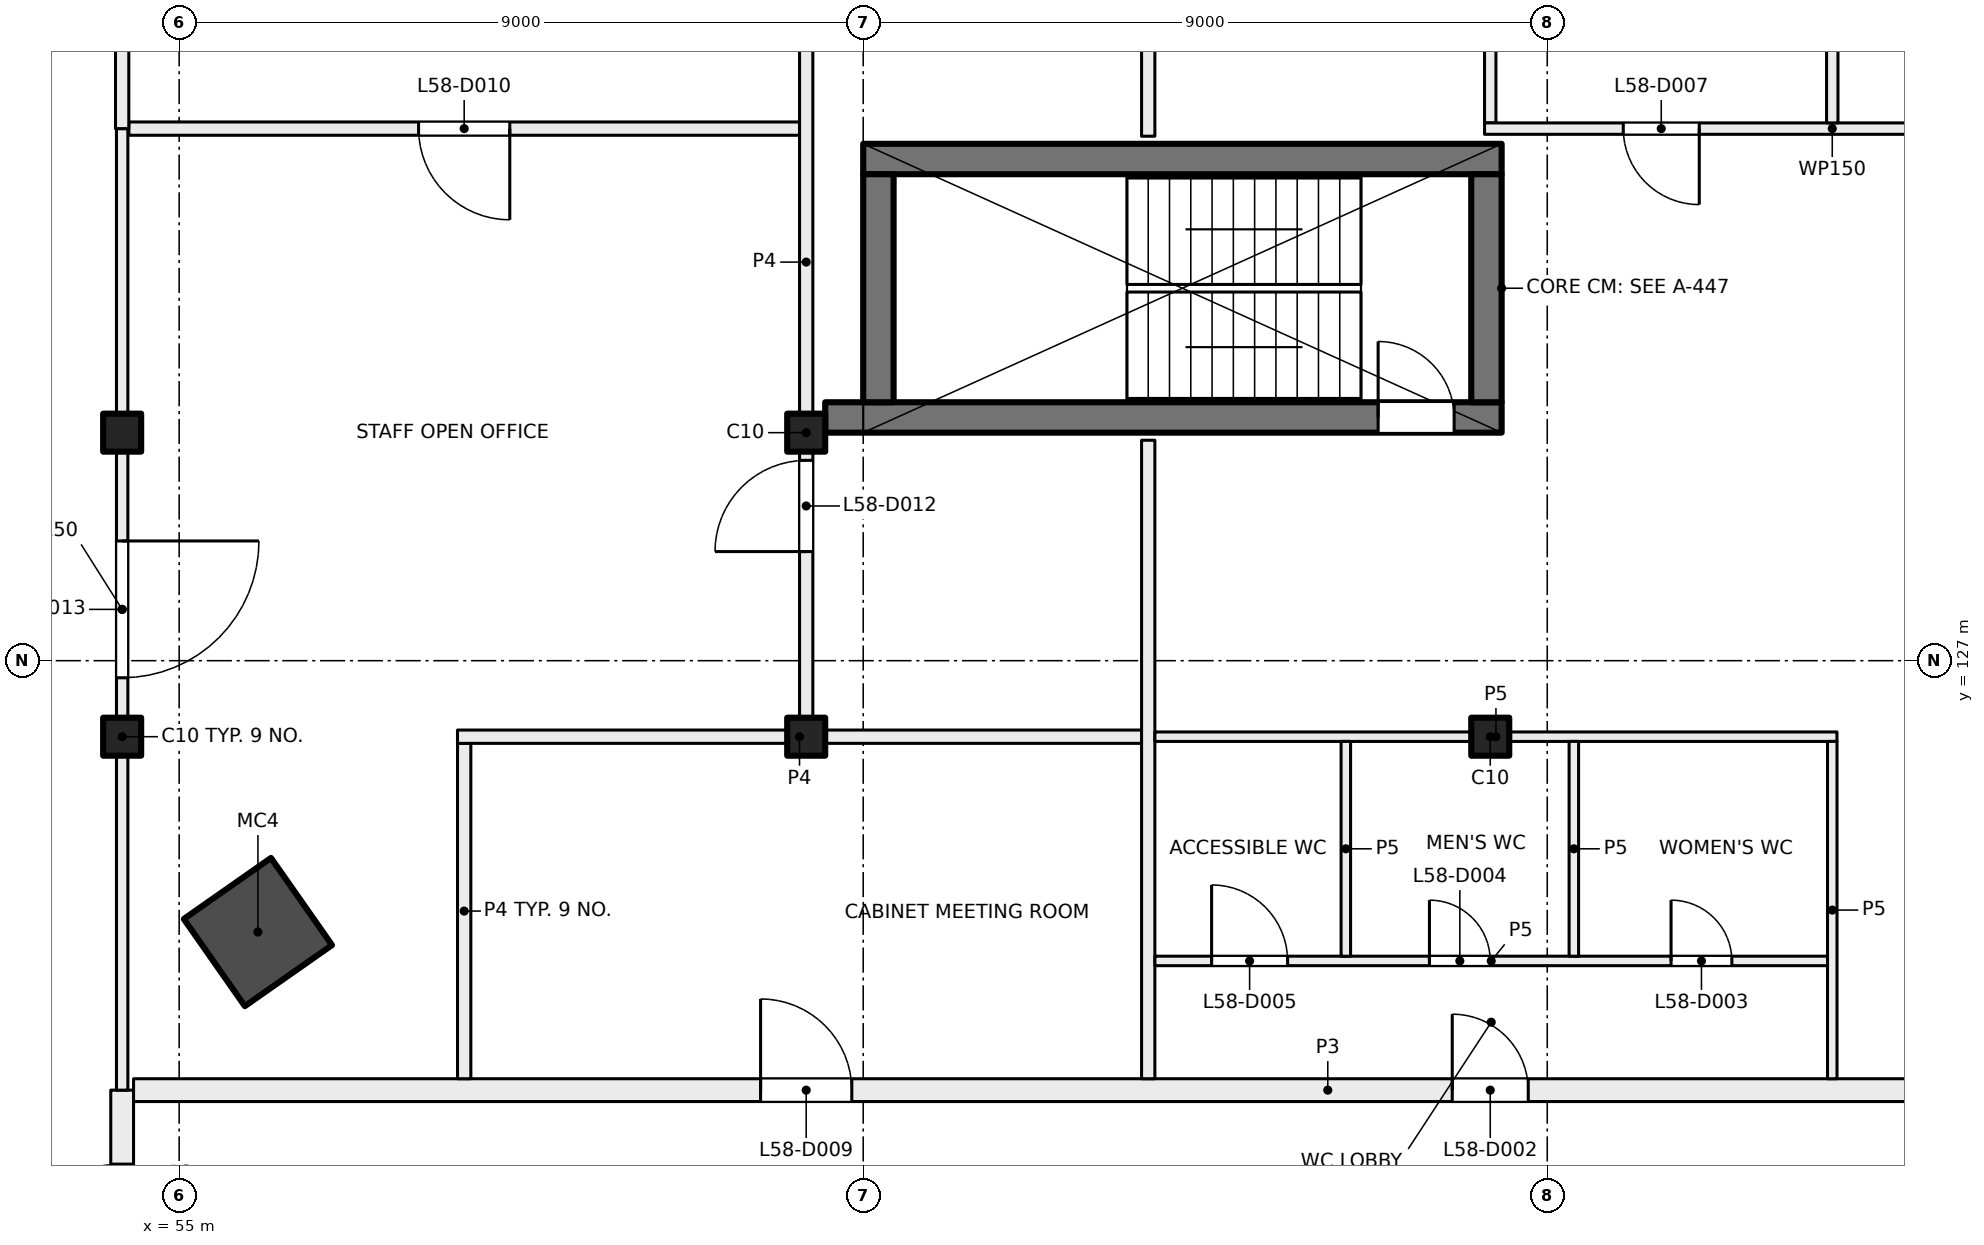
"""IFC4 building model, lengths in metres.
Left out: names, types, materials, properties, quantities, classifications, styles, units other than length and angle.
Written with IfcOpenShell. Run it as: python <this file> out.ifc"""

import sys

from ifc_helpers import new_model, si_unit, direction, frame, frame_2d, origin, origin_2d, place, context, subcontext, project, spatial, rectangle, hollow_rectangle, extrude, element, fill, save


model = new_model("IFC4")
c1 = context("Model", 3, precision=1e-05, world=origin(), true_north=direction((0.0, 1.0)))
c2 = subcontext(c1, "Body", "Model", "MODEL_VIEW")
j1 = project(units=[si_unit("LENGTHUNIT", "METRE"), si_unit("PLANEANGLEUNIT", "RADIAN")], contexts=[c1])
p1 = place(None, origin())
s1 = spatial("IfcSite", under=j1, at=p1, CompositionType="ELEMENT")
p2 = place(p1, origin())
s2 = spatial("IfcBuilding", under=s1, at=p2, CompositionType="ELEMENT")
p3 = place(p2, frame((0.0, 0.0, 245.5)))
s3 = spatial("IfcBuildingStorey", under=s2, at=p3, CompositionType="ELEMENT", Elevation=245.5)
p4 = place(p3, frame((56.036, 123.43, 0.0), z_axis=(0.0, 0.0, 1.0), x_axis=(0.573576436351, -0.819152044289, 0.0)))
e1 = element("IfcColumn", 1, at=p4, inside=s3, PredefinedType="COLUMN", context=c2, shape_type="SweptSolid", body=[
    extrude(hollow_rectangle(XDim=1.4, YDim=1.4, WallThickness=0.025, at=origin_2d()), origin(), (0.0, 0.0, 1.0), 4.0),
])
for number, where, z_axis, x_axis in (
    (2, (54.25, 130.0, 0.0), (0.0, 0.0, 1.0), (1.0, 0.0, 0.0)),
    (3, (63.25, 130.0, 0.0), (0.0, 0.0, 1.0), (1.0, 0.0, 0.0)),
    (4, (54.25, 126.0, 0.0), (0.0, 0.0, 1.0), (1.0, 0.0, 0.0)),
    (5, (63.25, 126.0, 0.0), (0.0, 0.0, 1.0), (1.0, 0.0, 0.0)),
    (6, (72.25, 126.0, 0.0), (0.0, 0.0, 1.0), (1.0, 0.0, 0.0)),
):
    element("IfcColumn", number, at=place(p3, frame(where, z_axis=z_axis, x_axis=x_axis)), inside=s3, PredefinedType="COLUMN", context=c2, shape_type="SweptSolid", body=[
        extrude(rectangle(XDim=0.5, YDim=0.5, at=origin_2d()), origin(), (0.0, 0.0, 1.0), 4.0),
    ])
p5 = place(p3, frame((63.5, 130.2, 0.0), z_axis=(0.0, 0.0, 1.0), x_axis=(1.0, 0.0, 0.0)))
e7 = element("IfcWall", 7, at=p5, inside=s3, PredefinedType="SHEAR", context=c2, shape_type="SweptSolid", body=[
    extrude(rectangle(XDim=8.9, YDim=0.4, at=frame_2d((4.45, 0.0))), origin(), (0.0, 0.0, 1.0), 4.0),
])
p6 = place(p5, frame((7.275, 0.0, 0.0)))
e8 = element("IfcOpeningElement", 8, at=p6, cuts=e7, PredefinedType="OPENING", context=c2, shape_type="SweptSolid", body=[
    extrude(rectangle(XDim=1.0, YDim=2.1, at=frame_2d((0.5, 1.05))), frame((0.0, 0.21, 0.0), z_axis=(0.0, -1.0, 0.0), x_axis=(1.0, 0.0, 0.0)), (0.0, 0.0, 1.0), 0.42),
])
p7 = place(p3, frame((64.0, 133.6, 0.0), z_axis=(0.0, 0.0, 1.0), x_axis=(1.0, 0.0, 0.0)))
e9 = element("IfcWall", 9, at=p7, inside=s3, PredefinedType="SHEAR", context=c2, shape_type="SweptSolid", body=[
    extrude(rectangle(XDim=8.4, YDim=0.4, at=frame_2d((4.2, 0.0))), origin(), (0.0, 0.0, 1.0), 4.0),
])
for number, where, z_axis, x_axis in (
    (10, (64.2, 130.4, 0.0), (0.0, 0.0, 1.0), (0.0, 1.0, 0.0)),
    (11, (72.2, 130.4, 0.0), (0.0, 0.0, 1.0), (0.0, 1.0, 0.0)),
):
    element("IfcWall", number, at=place(p3, frame(where, z_axis=z_axis, x_axis=x_axis)), inside=s3, PredefinedType="SHEAR", context=c2, shape_type="SweptSolid", body=[
        extrude(rectangle(XDim=3.0, YDim=0.4, at=frame_2d((1.5, 0.0))), origin(), (0.0, 0.0, 1.0), 4.0),
    ])
p8 = place(p3, frame((54.25, 117.6, 0.0), z_axis=(0.0, 0.0, 1.0), x_axis=(0.0, 1.0, 0.0)))
e12 = element("IfcWall", 12, at=p8, inside=s3, PredefinedType="PARTITIONING", context=c2, shape_type="SweptSolid", body=[
    extrude(rectangle(XDim=3.75, YDim=0.3, at=frame_2d((1.875, 0.0))), origin(), (0.0, 0.0, 1.0), 3.625),
])
p9 = place(p8, frame((0.977, 0.0, 0.0)))
e13 = element("IfcOpeningElement", 13, at=p9, cuts=e12, PredefinedType="OPENING", context=c2, shape_type="SweptSolid", body=[
    extrude(rectangle(XDim=1.8, YDim=2.1, at=frame_2d((0.9, 1.05))), frame((0.0, 0.16, 0.0), z_axis=(0.0, -1.0, 0.0), x_axis=(1.0, 0.0, 0.0)), (0.0, 0.0, 1.0), 0.32),
])
p10 = place(p3, frame((54.4, 121.35, 0.0), z_axis=(0.0, 0.0, 1.0), x_axis=(1.0, 0.0, 0.0)))
e14 = element("IfcWall", 14, at=p10, inside=s3, PredefinedType="PARTITIONING", context=c2, shape_type="SweptSolid", body=[
    extrude(rectangle(XDim=31.425, YDim=0.3, at=frame_2d((15.712, 0.0))), origin(), (0.0, 0.0, 1.0), 3.625),
])
p11 = place(p10, frame((17.35, 0.0, 0.0)))
e15 = element("IfcOpeningElement", 15, at=p11, cuts=e14, PredefinedType="OPENING", context=c2, shape_type="SweptSolid", body=[
    extrude(rectangle(XDim=1.0, YDim=2.1, at=frame_2d((0.5, 1.05))), frame((0.0, 0.16, 0.0), z_axis=(0.0, -1.0, 0.0), x_axis=(1.0, 0.0, 0.0)), (0.0, 0.0, 1.0), 0.32),
])
p12 = place(p10, frame((25.95, 0.0, 0.0)))
e16 = element("IfcOpeningElement", 16, at=p12, cuts=e14, PredefinedType="OPENING", context=c2, shape_type="SweptSolid", body=[
    extrude(rectangle(XDim=1.8, YDim=2.1, at=frame_2d((0.9, 1.05))), frame((0.0, 0.16, 0.0), z_axis=(0.0, -1.0, 0.0), x_axis=(1.0, 0.0, 0.0)), (0.0, 0.0, 1.0), 0.32),
])
p13 = place(p10, frame((8.25, 0.0, 0.0)))
e17 = element("IfcOpeningElement", 17, at=p13, cuts=e14, PredefinedType="OPENING", context=c2, shape_type="SweptSolid", body=[
    extrude(rectangle(XDim=1.2, YDim=2.1, at=frame_2d((0.6, 1.05))), frame((0.0, 0.16, 0.0), z_axis=(0.0, -1.0, 0.0), x_axis=(1.0, 0.0, 0.0)), (0.0, 0.0, 1.0), 0.32),
])
p14 = place(p3, frame((54.25, 134.0, 0.0), z_axis=(0.0, 0.0, 1.0), x_axis=(0.0, -1.0, 0.0)))
e18 = element("IfcWall", 18, at=p14, inside=s3, PredefinedType="PARTITIONING", context=c2, shape_type="SweptSolid", body=[
    extrude(rectangle(XDim=12.65, YDim=0.15, at=frame_2d((6.325, 0.0))), origin(), (0.0, 0.0, 1.0), 3.625),
])
p15 = place(p14, frame((5.425, 0.0, 0.0)))
e19 = element("IfcOpeningElement", 19, at=p15, cuts=e18, PredefinedType="OPENING", context=c2, shape_type="SweptSolid", body=[
    extrude(rectangle(XDim=1.8, YDim=2.1, at=frame_2d((0.9, 1.05))), frame((0.0, 0.085, 0.0), z_axis=(0.0, -1.0, 0.0), x_axis=(1.0, 0.0, 0.0)), (0.0, 0.0, 1.0), 0.17),
])
p16 = place(p3, frame((63.162, 134.0, 0.0), z_axis=(0.0, 0.0, 1.0), x_axis=(-1.0, 0.0, 0.0)))
e20 = element("IfcWall", 20, at=p16, inside=s3, PredefinedType="PARTITIONING", context=c2, shape_type="SweptSolid", body=[
    extrude(rectangle(XDim=8.824, YDim=0.175, at=frame_2d((4.412, 0.0))), origin(), (0.0, 0.0, 1.0), 3.625),
])
p17 = place(p16, frame((3.812, 0.0, 0.0)))
e21 = element("IfcOpeningElement", 21, at=p17, cuts=e20, PredefinedType="OPENING", context=c2, shape_type="SweptSolid", body=[
    extrude(rectangle(XDim=1.2, YDim=2.1, at=frame_2d((0.6, 1.05))), frame((0.0, 0.097, 0.0), z_axis=(0.0, -1.0, 0.0), x_axis=(1.0, 0.0, 0.0)), (0.0, 0.0, 1.0), 0.195),
])
p18 = place(p3, frame((54.25, 138.4, 0.0), z_axis=(0.0, 0.0, 1.0), x_axis=(0.0, -1.0, 0.0)))
e22 = element("IfcWall", 22, at=p18, inside=s3, PredefinedType="PARTITIONING", context=c2, shape_type="SweptSolid", body=[
    extrude(rectangle(XDim=4.4, YDim=0.175, at=frame_2d((2.2, 0.0))), origin(), (0.0, 0.0, 1.0), 3.625),
])
p19 = place(p3, frame((58.75, 125.912, 0.0), z_axis=(0.0, 0.0, 1.0), x_axis=(0.0, -1.0, 0.0)))
e23 = element("IfcWall", 23, at=p19, inside=s3, PredefinedType="PARTITIONING", context=c2, shape_type="SweptSolid", body=[
    extrude(rectangle(XDim=4.412, YDim=0.175, at=frame_2d((2.206, 0.0))), origin(), (0.0, 0.0, 1.0), 3.625),
])
p20 = place(p3, frame((58.662, 126.0, 0.0), z_axis=(0.0, 0.0, 1.0), x_axis=(1.0, 0.0, 0.0)))
e24 = element("IfcWall", 24, at=p20, inside=s3, PredefinedType="PARTITIONING", context=c2, shape_type="SweptSolid", body=[
    extrude(rectangle(XDim=9.0, YDim=0.175, at=frame_2d((4.5, 0.0))), origin(), (0.0, 0.0, 1.0), 3.625),
])
p21 = place(p3, frame((63.25, 126.088, 0.0), z_axis=(0.0, 0.0, 1.0), x_axis=(0.0, 1.0, 0.0)))
e25 = element("IfcWall", 25, at=p21, inside=s3, PredefinedType="PARTITIONING", context=c2, shape_type="SweptSolid", body=[
    extrude(rectangle(XDim=12.312, YDim=0.175, at=frame_2d((6.156, 0.0))), origin(), (0.0, 0.0, 1.0), 3.625),
])
p22 = place(p21, frame((2.347, 0.0, 0.0)))
e26 = element("IfcOpeningElement", 26, at=p22, cuts=e25, PredefinedType="OPENING", context=c2, shape_type="SweptSolid", body=[
    extrude(rectangle(XDim=1.2, YDim=2.1, at=frame_2d((0.6, 1.05))), frame((0.0, 0.097, 0.0), z_axis=(0.0, -1.0, 0.0), x_axis=(1.0, 0.0, 0.0)), (0.0, 0.0, 1.0), 0.195),
])
p23 = place(p3, frame((67.75, 121.5, 0.0), z_axis=(0.0, 0.0, 1.0), x_axis=(0.0, 1.0, 0.0)))
e27 = element("IfcWall", 27, at=p23, inside=s3, PredefinedType="PARTITIONING", context=c2, shape_type="SweptSolid", body=[
    extrude(rectangle(XDim=8.4, YDim=0.175, at=frame_2d((4.2, 0.0))), origin(), (0.0, 0.0, 1.0), 3.625),
])
p24 = place(p3, frame((67.838, 123.05, 0.0), z_axis=(0.0, 0.0, 1.0), x_axis=(1.0, 0.0, 0.0)))
e28 = element("IfcWall", 28, at=p24, inside=s3, PredefinedType="PARTITIONING", context=c2, shape_type="SweptSolid", body=[
    extrude(rectangle(XDim=8.85, YDim=0.125, at=frame_2d((4.425, 0.0))), origin(), (0.0, 0.0, 1.0), 3.625),
])
p25 = place(p24, frame((6.791, 0.0, 0.0)))
e29 = element("IfcOpeningElement", 29, at=p25, cuts=e28, PredefinedType="OPENING", context=c2, shape_type="SweptSolid", body=[
    extrude(rectangle(XDim=0.8, YDim=2.1, at=frame_2d((0.4, 1.05))), frame((0.0, 0.073, 0.0), z_axis=(0.0, -1.0, 0.0), x_axis=(1.0, 0.0, 0.0)), (0.0, 0.0, 1.0), 0.145),
])
p26 = place(p24, frame((3.612, 0.0, 0.0)))
e30 = element("IfcOpeningElement", 30, at=p26, cuts=e28, PredefinedType="OPENING", context=c2, shape_type="SweptSolid", body=[
    extrude(rectangle(XDim=0.8, YDim=2.1, at=frame_2d((0.4, 1.05))), frame((0.0, 0.073, 0.0), z_axis=(0.0, -1.0, 0.0), x_axis=(1.0, 0.0, 0.0)), (0.0, 0.0, 1.0), 0.145),
])
p27 = place(p24, frame((0.746, 0.0, 0.0)))
e31 = element("IfcOpeningElement", 31, at=p27, cuts=e28, PredefinedType="OPENING", context=c2, shape_type="SweptSolid", body=[
    extrude(rectangle(XDim=1.0, YDim=2.1, at=frame_2d((0.5, 1.05))), frame((0.0, 0.073, 0.0), z_axis=(0.0, -1.0, 0.0), x_axis=(1.0, 0.0, 0.0)), (0.0, 0.0, 1.0), 0.145),
])
p28 = place(p3, frame((67.838, 126.0, 0.0), z_axis=(0.0, 0.0, 1.0), x_axis=(1.0, 0.0, 0.0)))
e32 = element("IfcWall", 32, at=p28, inside=s3, PredefinedType="PARTITIONING", context=c2, shape_type="SweptSolid", body=[
    extrude(rectangle(XDim=8.974, YDim=0.125, at=frame_2d((4.487, 0.0))), origin(), (0.0, 0.0, 1.0), 3.625),
])
p29 = place(p3, frame((67.75, 133.9, 0.0), z_axis=(0.0, 0.0, 1.0), x_axis=(0.0, 1.0, 0.0)))
e33 = element("IfcWall", 33, at=p29, inside=s3, PredefinedType="PARTITIONING", context=c2, shape_type="SweptSolid", body=[
    extrude(rectangle(XDim=4.5, YDim=0.175, at=frame_2d((2.25, 0.0))), origin(), (0.0, 0.0, 1.0), 3.625),
])
p30 = place(p3, frame((70.35, 125.938, 0.0), z_axis=(0.0, 0.0, 1.0), x_axis=(0.0, -1.0, 0.0)))
e34 = element("IfcWall", 34, at=p30, inside=s3, PredefinedType="PARTITIONING", context=c2, shape_type="SweptSolid", body=[
    extrude(rectangle(XDim=2.826, YDim=0.125, at=frame_2d((1.413, 0.0))), origin(), (0.0, 0.0, 1.0), 3.625),
])
p31 = place(p3, frame((72.25, 134.075, 0.0), z_axis=(0.0, 0.0, 1.0), x_axis=(0.0, 1.0, 0.0)))
e35 = element("IfcWall", 35, at=p31, inside=s3, PredefinedType="PARTITIONING", context=c2, shape_type="SweptSolid", body=[
    extrude(rectangle(XDim=4.325, YDim=0.15, at=frame_2d((2.163, 0.0))), origin(), (0.0, 0.0, 1.0), 3.625),
])
p32 = place(p3, frame((81.325, 134.0, 0.0), z_axis=(0.0, 0.0, 1.0), x_axis=(-1.0, 0.0, 0.0)))
e36 = element("IfcWall", 36, at=p32, inside=s3, PredefinedType="PARTITIONING", context=c2, shape_type="SweptSolid", body=[
    extrude(rectangle(XDim=9.15, YDim=0.15, at=frame_2d((4.575, 0.0))), origin(), (0.0, 0.0, 1.0), 3.625),
])
p33 = place(p32, frame((1.825, 0.0, 0.0)))
e37 = element("IfcOpeningElement", 37, at=p33, cuts=e36, PredefinedType="OPENING", context=c2, shape_type="SweptSolid", body=[
    extrude(rectangle(XDim=1.0, YDim=2.1, at=frame_2d((0.5, 1.05))), frame((0.0, 0.085, 0.0), z_axis=(0.0, -1.0, 0.0), x_axis=(1.0, 0.0, 0.0)), (0.0, 0.0, 1.0), 0.17),
])
p34 = place(p32, frame((6.325, 0.0, 0.0)))
e38 = element("IfcOpeningElement", 38, at=p34, cuts=e36, PredefinedType="OPENING", context=c2, shape_type="SweptSolid", body=[
    extrude(rectangle(XDim=1.0, YDim=2.1, at=frame_2d((0.5, 1.05))), frame((0.0, 0.085, 0.0), z_axis=(0.0, -1.0, 0.0), x_axis=(1.0, 0.0, 0.0)), (0.0, 0.0, 1.0), 0.17),
])
p35 = place(p3, frame((73.35, 125.938, 0.0), z_axis=(0.0, 0.0, 1.0), x_axis=(0.0, -1.0, 0.0)))
e39 = element("IfcWall", 39, at=p35, inside=s3, PredefinedType="PARTITIONING", context=c2, shape_type="SweptSolid", body=[
    extrude(rectangle(XDim=2.826, YDim=0.125, at=frame_2d((1.413, 0.0))), origin(), (0.0, 0.0, 1.0), 3.625),
])
p36 = place(p3, frame((76.75, 125.938, 0.0), z_axis=(0.0, 0.0, 1.0), x_axis=(0.0, -1.0, 0.0)))
e40 = element("IfcWall", 40, at=p36, inside=s3, PredefinedType="PARTITIONING", context=c2, shape_type="SweptSolid", body=[
    extrude(rectangle(XDim=4.438, YDim=0.125, at=frame_2d((2.219, 0.0))), origin(), (0.0, 0.0, 1.0), 3.625),
])
p37 = place(p3, frame((76.75, 134.075, 0.0), z_axis=(0.0, 0.0, 1.0), x_axis=(0.0, 1.0, 0.0)))
e41 = element("IfcWall", 41, at=p37, inside=s3, PredefinedType="PARTITIONING", context=c2, shape_type="SweptSolid", body=[
    extrude(rectangle(XDim=4.325, YDim=0.15, at=frame_2d((2.163, 0.0))), origin(), (0.0, 0.0, 1.0), 3.625),
])
p38 = place(p6, origin())
e42 = element("IfcDoor", 42, at=p38, inside=s3, OperationType="SINGLE_SWING_LEFT", PredefinedType="DOOR", context=c2, shape_type="SweptSolid", body=[
    extrude(rectangle(XDim=1.0, YDim=2.1, at=frame_2d((0.5, 1.05))), frame((0.0, 0.025, 0.0), z_axis=(0.0, -1.0, 0.0), x_axis=(1.0, 0.0, 0.0)), (0.0, 0.0, 1.0), 0.05),
])
fill(e8, e42)
p39 = place(p11, origin())
e43 = element("IfcDoor", 43, at=p39, inside=s3, OperationType="SINGLE_SWING_LEFT", PredefinedType="DOOR", context=c2, shape_type="SweptSolid", body=[
    extrude(rectangle(XDim=1.0, YDim=2.1, at=frame_2d((0.5, 1.05))), frame((0.0, 0.025, 0.0), z_axis=(0.0, -1.0, 0.0), x_axis=(1.0, 0.0, 0.0)), (0.0, 0.0, 1.0), 0.05),
])
fill(e15, e43)
p40 = place(p25, origin())
e44 = element("IfcDoor", 44, at=p40, inside=s3, OperationType="SINGLE_SWING_RIGHT", PredefinedType="DOOR", context=c2, shape_type="SweptSolid", body=[
    extrude(rectangle(XDim=0.8, YDim=2.1, at=frame_2d((0.4, 1.05))), frame((0.0, 0.025, 0.0), z_axis=(0.0, -1.0, 0.0), x_axis=(1.0, 0.0, 0.0)), (0.0, 0.0, 1.0), 0.05),
])
fill(e29, e44)
p41 = place(p26, origin())
e45 = element("IfcDoor", 45, at=p41, inside=s3, OperationType="SINGLE_SWING_LEFT", PredefinedType="DOOR", context=c2, shape_type="SweptSolid", body=[
    extrude(rectangle(XDim=0.8, YDim=2.1, at=frame_2d((0.4, 1.05))), frame((0.0, 0.025, 0.0), z_axis=(0.0, -1.0, 0.0), x_axis=(1.0, 0.0, 0.0)), (0.0, 0.0, 1.0), 0.05),
])
fill(e30, e45)
p42 = place(p27, origin())
e46 = element("IfcDoor", 46, at=p42, inside=s3, OperationType="SINGLE_SWING_LEFT", PredefinedType="DOOR", context=c2, shape_type="SweptSolid", body=[
    extrude(rectangle(XDim=1.0, YDim=2.1, at=frame_2d((0.5, 1.05))), frame((0.0, 0.025, 0.0), z_axis=(0.0, -1.0, 0.0), x_axis=(1.0, 0.0, 0.0)), (0.0, 0.0, 1.0), 0.05),
])
fill(e31, e46)
p43 = place(p34, origin())
e47 = element("IfcDoor", 47, at=p43, inside=s3, OperationType="SINGLE_SWING_RIGHT", PredefinedType="DOOR", context=c2, shape_type="SweptSolid", body=[
    extrude(rectangle(XDim=1.0, YDim=2.1, at=frame_2d((0.5, 1.05))), frame((0.0, 0.025, 0.0), z_axis=(0.0, -1.0, 0.0), x_axis=(1.0, 0.0, 0.0)), (0.0, 0.0, 1.0), 0.05),
])
fill(e38, e47)
p44 = place(p13, origin())
e48 = element("IfcDoor", 48, at=p44, inside=s3, OperationType="DOUBLE_DOOR_SINGLE_SWING", PredefinedType="DOOR", context=c2, shape_type="SweptSolid", body=[
    extrude(rectangle(XDim=1.2, YDim=2.1, at=frame_2d((0.6, 1.05))), frame((0.0, 0.025, 0.0), z_axis=(0.0, -1.0, 0.0), x_axis=(1.0, 0.0, 0.0)), (0.0, 0.0, 1.0), 0.05),
])
fill(e17, e48)
p45 = place(p17, origin())
e49 = element("IfcDoor", 49, at=p45, inside=s3, OperationType="DOUBLE_DOOR_SINGLE_SWING", PredefinedType="DOOR", context=c2, shape_type="SweptSolid", body=[
    extrude(rectangle(XDim=1.2, YDim=2.1, at=frame_2d((0.6, 1.05))), frame((0.0, 0.025, 0.0), z_axis=(0.0, -1.0, 0.0), x_axis=(1.0, 0.0, 0.0)), (0.0, 0.0, 1.0), 0.05),
])
fill(e21, e49)
p46 = place(p9, origin())
e50 = element("IfcDoor", 50, at=p46, inside=s3, OperationType="DOUBLE_DOOR_SINGLE_SWING", PredefinedType="DOOR", context=c2, shape_type="SweptSolid", body=[
    extrude(rectangle(XDim=1.8, YDim=2.1, at=frame_2d((0.9, 1.05))), frame((0.0, 0.025, 0.0), z_axis=(0.0, -1.0, 0.0), x_axis=(1.0, 0.0, 0.0)), (0.0, 0.0, 1.0), 0.05),
])
fill(e13, e50)
p47 = place(p22, origin())
e51 = element("IfcDoor", 51, at=p47, inside=s3, OperationType="DOUBLE_DOOR_SINGLE_SWING", PredefinedType="DOOR", context=c2, shape_type="SweptSolid", body=[
    extrude(rectangle(XDim=1.2, YDim=2.1, at=frame_2d((0.6, 1.05))), frame((0.0, 0.025, 0.0), z_axis=(0.0, -1.0, 0.0), x_axis=(1.0, 0.0, 0.0)), (0.0, 0.0, 1.0), 0.05),
])
fill(e26, e51)
p48 = place(p15, origin())
e52 = element("IfcDoor", 52, at=p48, inside=s3, OperationType="DOUBLE_DOOR_SINGLE_SWING", PredefinedType="DOOR", context=c2, shape_type="SweptSolid", body=[
    extrude(rectangle(XDim=1.8, YDim=2.1, at=frame_2d((0.9, 1.05))), frame((0.0, 0.025, 0.0), z_axis=(0.0, -1.0, 0.0), x_axis=(1.0, 0.0, 0.0)), (0.0, 0.0, 1.0), 0.05),
])
fill(e19, e52)
save(model, sys.argv[1])
